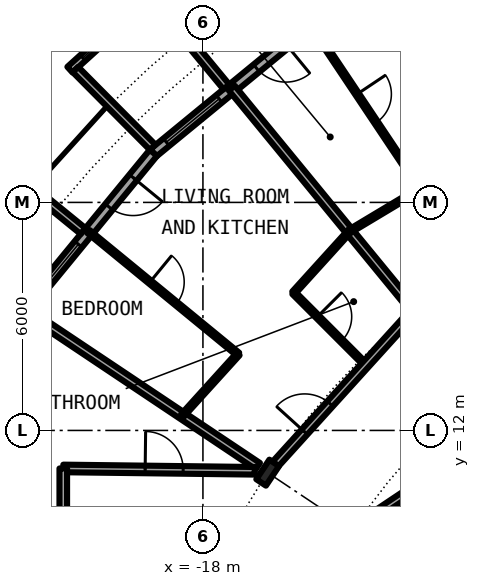
"""IFC4 building model, lengths in metres.
Left out: names, types, materials, properties, quantities, classifications, styles, units other than length and angle.
Written with IfcOpenShell. Run it as: python <this file> out.ifc"""

import sys

from ifc_helpers import new_model, si_unit, direction, frame, frame_2d, origin, origin_2d, place, context, subcontext, project, spatial, rectangle, circle, i_section, extrude, element, fill, save


model = new_model("IFC4")
c1 = context("Model", 3, precision=1e-05, world=origin(), true_north=direction((0.0, 1.0)))
c2 = subcontext(c1, "Body", "Model", "MODEL_VIEW")
j1 = project(units=[si_unit("LENGTHUNIT", "METRE"), si_unit("PLANEANGLEUNIT", "RADIAN")], contexts=[c1])
p1 = place(None, origin())
s1 = spatial("IfcSite", under=j1, at=p1, CompositionType="ELEMENT")
p2 = place(p1, origin())
s2 = spatial("IfcBuilding", under=s1, at=p2, CompositionType="ELEMENT")
p3 = place(p2, frame((0.0, 0.0, 31.95)))
s3 = spatial("IfcBuildingStorey", under=s2, at=p3, CompositionType="ELEMENT", Elevation=31.95)
p4 = place(p3, frame((-16.297, 10.889, 0.0), z_axis=(0.0, 0.0, 1.0), x_axis=(-0.831469612303, 0.55557023302, 0.0)))
e1 = element("IfcColumn", 1, at=p4, inside=s3, PredefinedType="COLUMN", context=c2, shape_type="SweptSolid", body=[
    extrude(i_section(OverallWidth=0.305, OverallDepth=0.62, WebThickness=0.021, FlangeThickness=0.04, FilletRadius=0.027, at=origin_2d()), origin(), (0.0, 0.0, 1.0), 3.05),
])
p5 = place(p3, frame((-15.167, 22.699, 0.0), z_axis=(0.0, 0.0, 1.0), x_axis=(-0.773019449054, -0.634382322723, 0.0)))
e2 = element("IfcWall", 2, at=p5, inside=s3, PredefinedType="SOLIDWALL", context=c2, shape_type="SweptSolid", body=[
    extrude(rectangle(XDim=5.352, YDim=0.25, at=frame_2d((2.676, 0.0))), origin(), (0.0, 0.0, 1.0), 2.7),
])
p6 = place(p5, frame((0.841, 0.0, 0.0)))
e3 = element("IfcOpeningElement", 3, at=p6, cuts=e2, PredefinedType="OPENING", context=c2, shape_type="SweptSolid", body=[
    extrude(rectangle(XDim=1.0, YDim=2.2, at=frame_2d((0.5, 1.1))), frame((0.0, 0.135, 0.0), z_axis=(0.0, -1.0, 0.0), x_axis=(1.0, 0.0, 0.0)), (0.0, 0.0, 1.0), 0.27),
])
p7 = place(p5, frame((3.111, 0.0, 0.3)))
e4 = element("IfcOpeningElement", 4, at=p7, cuts=e2, PredefinedType="OPENING", context=c2, shape_type="SweptSolid", body=[
    extrude(rectangle(XDim=1.8, YDim=2.1, at=frame_2d((0.9, 1.05))), frame((0.0, 0.135, 0.0), z_axis=(0.0, -1.0, 0.0), x_axis=(1.0, 0.0, 0.0)), (0.0, 0.0, 1.0), 0.27),
])
p8 = place(p3, frame((-19.282, 23.503, -0.03), z_axis=(0.0, 0.0, 1.0), x_axis=(-0.740998365753, -0.671506829416, 0.0)))
e5 = element("IfcWall", 5, at=p8, inside=s3, PredefinedType="SOLIDWALL", context=c2, shape_type="SweptSolid", body=[
    extrude(rectangle(XDim=2.993, YDim=0.2, at=frame_2d((1.497, 0.0))), origin(), (0.0, 0.0, 1.0), 2.73),
])
p9 = place(p8, frame((0.457, 0.0, 0.33)))
e6 = element("IfcOpeningElement", 6, at=p9, cuts=e5, PredefinedType="OPENING", context=c2, shape_type="SweptSolid", body=[
    extrude(circle(Radius=1.04, at=frame_2d((1.04, 1.04))), frame((0.0, 0.11, 0.0), z_axis=(0.0, -1.0, 0.0), x_axis=(1.0, 0.0, 0.0)), (0.0, 0.0, 1.0), 0.22),
])
p10 = place(p3, frame((-17.384, 21.041, -0.03), z_axis=(0.0, 0.0, 1.0), x_axis=(-0.63709551667, 0.770784861449, 0.0)))
e7 = element("IfcWall", 7, at=p10, inside=s3, PredefinedType="SOLIDWALL", context=c2, shape_type="SweptSolid", body=[
    extrude(rectangle(XDim=3.006, YDim=0.2, at=frame_2d((1.503, 0.0))), origin(), (0.0, 0.0, 1.0), 2.73),
])
p11 = place(p3, frame((-19.323, 19.45, -0.03), z_axis=(0.0, 0.0, 1.0), x_axis=(-0.704476739375, 0.709727076896, 0.0)))
e8 = element("IfcWall", 8, at=p11, inside=s3, PredefinedType="SOLIDWALL", context=c2, shape_type="SweptSolid", body=[
    extrude(rectangle(XDim=2.883, YDim=0.2, at=frame_2d((1.441, 0.0))), origin(), (0.0, 0.0, 1.0), 2.73),
])
p12 = place(p3, frame((-19.304, 19.304, 0.0), z_axis=(0.0, 0.0, 1.0), x_axis=(-0.634382322723, -0.773019449054, 0.0)))
e9 = element("IfcWall", 9, at=p12, inside=s3, PredefinedType="SOLIDWALL", context=c2, shape_type="SweptSolid", body=[
    extrude(rectangle(XDim=5.352, YDim=0.25, at=frame_2d((2.676, 0.0))), origin(), (0.0, 0.0, 1.0), 2.7),
])
p13 = place(p12, frame((0.841, 0.0, 0.0)))
e10 = element("IfcOpeningElement", 10, at=p13, cuts=e9, PredefinedType="OPENING", context=c2, shape_type="SweptSolid", body=[
    extrude(rectangle(XDim=1.0, YDim=2.2, at=frame_2d((0.5, 1.1))), frame((0.0, 0.135, 0.0), z_axis=(0.0, -1.0, 0.0), x_axis=(1.0, 0.0, 0.0)), (0.0, 0.0, 1.0), 0.27),
])
p14 = place(p12, frame((3.111, 0.0, 0.3)))
e11 = element("IfcOpeningElement", 11, at=p14, cuts=e9, PredefinedType="OPENING", context=c2, shape_type="SweptSolid", body=[
    extrude(rectangle(XDim=1.8, YDim=2.1, at=frame_2d((0.9, 1.05))), frame((0.0, 0.135, 0.0), z_axis=(0.0, -1.0, 0.0), x_axis=(1.0, 0.0, 0.0)), (0.0, 0.0, 1.0), 0.27),
])
p15 = place(p3, frame((-21.155, 17.246, -0.03), z_axis=(0.0, 0.0, 1.0), x_axis=(-0.775179004516, 0.631741648902, 0.0)))
e12 = element("IfcWall", 12, at=p15, inside=s3, PredefinedType="SOLIDWALL", context=c2, shape_type="SweptSolid", body=[
    extrude(rectangle(XDim=3.006, YDim=0.2, at=frame_2d((1.503, 0.0))), origin(), (0.0, 0.0, 1.0), 2.73),
])
p16 = place(p3, frame((-22.595, 15.097, 0.0), z_axis=(0.0, 0.0, 1.0), x_axis=(0.831465568067, -0.555576285599, 0.0)))
e13 = element("IfcWall", 13, at=p16, inside=s3, PredefinedType="PARTITIONING", context=c2, shape_type="SweptSolid", body=[
    extrude(rectangle(XDim=7.264, YDim=0.2, at=frame_2d((3.632, 0.0))), origin(), (0.0, 0.0, 1.0), 2.7),
])
p17 = place(p3, frame((-21.012, 17.233, 0.0), z_axis=(0.0, 0.0, 1.0), x_axis=(0.77326214499, -0.634086472908, 0.0)))
e14 = element("IfcWall", 14, at=p17, inside=s3, PredefinedType="PARTITIONING", context=c2, shape_type="SweptSolid", body=[
    extrude(rectangle(XDim=5.089, YDim=0.1, at=frame_2d((2.544, 0.0))), origin(), (0.0, 0.0, 1.0), 2.7),
])
p18 = place(p17, frame((2.094, 0.0, 0.0)))
e15 = element("IfcOpeningElement", 15, at=p18, cuts=e14, PredefinedType="OPENING", context=c2, shape_type="SweptSolid", body=[
    extrude(rectangle(XDim=0.9, YDim=2.3, at=frame_2d((0.45, 1.15))), frame((0.0, 0.06, 0.0), z_axis=(0.0, -1.0, 0.0), x_axis=(1.0, 0.0, 0.0)), (0.0, 0.0, 1.0), 0.12),
])
p19 = place(p3, frame((-17.24, 21.007, 0.0), z_axis=(0.0, 0.0, 1.0), x_axis=(0.634381303318, -0.773020285633, 0.0)))
e16 = element("IfcWall", 16, at=p19, inside=s3, PredefinedType="PARTITIONING", context=c2, shape_type="SweptSolid", body=[
    extrude(rectangle(XDim=7.576, YDim=0.2, at=frame_2d((3.788, 0.0))), origin(), (0.0, 0.0, 1.0), 2.7),
])
p20 = place(p3, frame((-15.612, 15.622, 0.0), z_axis=(0.0, 0.0, 1.0), x_axis=(0.706741540154, -0.707471833659, 0.0)))
e17 = element("IfcWall", 17, at=p20, inside=s3, PredefinedType="PARTITIONING", context=c2, shape_type="SweptSolid", body=[
    extrude(rectangle(XDim=2.674, YDim=0.1, at=frame_2d((1.337, 0.0))), origin(), (0.0, 0.0, 1.0), 2.7),
])
p21 = place(p20, frame((0.887, 0.0, 0.0)))
e18 = element("IfcOpeningElement", 18, at=p21, cuts=e17, PredefinedType="OPENING", context=c2, shape_type="SweptSolid", body=[
    extrude(rectangle(XDim=0.9, YDim=2.3, at=frame_2d((0.45, 1.15))), frame((0.0, 0.06, 0.0), z_axis=(0.0, -1.0, 0.0), x_axis=(1.0, 0.0, 0.0)), (0.0, 0.0, 1.0), 0.12),
])
p22 = place(p3, frame((-15.105, 22.59, 0.0), z_axis=(0.0, 0.0, 1.0), x_axis=(0.555939561221, -0.831222716406, 0.0)))
e19 = element("IfcWall", 19, at=p22, inside=s3, PredefinedType="PARTITIONING", context=c2, shape_type="SweptSolid", body=[
    extrude(rectangle(XDim=5.089, YDim=0.1, at=frame_2d((2.544, 0.0))), origin(), (0.0, 0.0, 1.0), 2.7),
])
p23 = place(p22, frame((2.094, 0.0, 0.0)))
e20 = element("IfcOpeningElement", 20, at=p23, cuts=e19, PredefinedType="OPENING", context=c2, shape_type="SweptSolid", body=[
    extrude(rectangle(XDim=0.9, YDim=2.3, at=frame_2d((0.45, 1.15))), frame((0.0, 0.06, 0.0), z_axis=(0.0, -1.0, 0.0), x_axis=(1.0, 0.0, 0.0)), (0.0, 0.0, 1.0), 0.12),
])
p24 = place(p3, frame((-21.675, 11.0, 0.0), z_axis=(0.0, 0.0, 1.0), x_axis=(0.99992425795, -0.012307654658, 0.0)))
e21 = element("IfcWall", 21, at=p24, inside=s3, PredefinedType="PARTITIONING", context=c2, shape_type="SweptSolid", body=[
    extrude(rectangle(XDim=5.039, YDim=0.2, at=frame_2d((2.519, 0.0))), origin(), (0.0, 0.0, 1.0), 2.7),
])
p25 = place(p24, frame((2.155, 0.0, 0.0)))
e22 = element("IfcOpeningElement", 22, at=p25, cuts=e21, PredefinedType="OPENING", context=c2, shape_type="SweptSolid", body=[
    extrude(rectangle(XDim=1.0, YDim=2.3, at=frame_2d((0.5, 1.15))), frame((0.0, 0.11, 0.0), z_axis=(0.0, -1.0, 0.0), x_axis=(1.0, 0.0, 0.0)), (0.0, 0.0, 1.0), 0.22),
])
p26 = place(p3, frame((-14.039, 9.396, 0.0), z_axis=(0.0, 0.0, 1.0), x_axis=(0.831348689697, 0.555751163866, 0.0)))
e23 = element("IfcWall", 23, at=p26, inside=s3, PredefinedType="PARTITIONING", context=c2, shape_type="SweptSolid", body=[
    extrude(rectangle(XDim=12.914, YDim=0.2, at=frame_2d((6.457, 0.0))), origin(), (0.0, 0.0, 1.0), 2.7),
])
p27 = place(p26, frame((7.568, 0.0, 0.0)))
e24 = element("IfcOpeningElement", 24, at=p27, cuts=e23, PredefinedType="OPENING", context=c2, shape_type="SweptSolid", body=[
    extrude(rectangle(XDim=1.0, YDim=2.3, at=frame_2d((0.5, 1.15))), frame((0.0, 0.11, 0.0), z_axis=(0.0, -1.0, 0.0), x_axis=(1.0, 0.0, 0.0)), (0.0, 0.0, 1.0), 0.22),
])
p28 = place(p3, frame((-16.193, 11.003, 0.0), z_axis=(0.0, 0.0, 1.0), x_axis=(0.671514934772, 0.740991020444, 0.0)))
e25 = element("IfcWall", 25, at=p28, inside=s3, PredefinedType="PARTITIONING", context=c2, shape_type="SweptSolid", body=[
    extrude(rectangle(XDim=5.598, YDim=0.2, at=frame_2d((2.799, 0.0))), origin(), (0.0, 0.0, 1.0), 2.38),
])
p29 = place(p28, frame((1.293, 0.0, 0.0)))
e26 = element("IfcOpeningElement", 26, at=p29, cuts=e25, PredefinedType="OPENING", context=c2, shape_type="SweptSolid", body=[
    extrude(rectangle(XDim=1.0, YDim=2.3, at=frame_2d((0.5, 1.15))), frame((0.0, 0.11, 0.0), z_axis=(0.0, -1.0, 0.0), x_axis=(1.0, 0.0, 0.0)), (0.0, 0.0, 1.0), 0.22),
])
p30 = place(p3, frame((-21.675, 9.4, 0.0), z_axis=(0.0, 0.0, 1.0), x_axis=(0.0, 1.0, 0.0)))
e27 = element("IfcWall", 27, at=p30, inside=s3, PredefinedType="PARTITIONING", context=c2, shape_type="SweptSolid", body=[
    extrude(rectangle(XDim=1.6, YDim=0.2, at=frame_2d((0.8, 0.0))), origin(), (0.0, 0.0, 1.0), 2.7),
])
for number, where, z_axis, x_axis in (
    (28, (-18.538, 12.394, 0.0), (0.0, 0.0, 1.0), (0.672, 0.741, 0.0)),
    (29, (-15.613, 15.621, 0.0), (0.0, 0.0, 1.0), (0.672, 0.741, 0.0)),
):
    element("IfcWall", number, at=place(p3, frame(where, z_axis=z_axis, x_axis=x_axis)), inside=s3, PredefinedType="PARTITIONING", context=c2, shape_type="SweptSolid", body=[
        extrude(rectangle(XDim=2.183, YDim=0.1, at=frame_2d((1.091, 0.0))), origin(), (0.0, 0.0, 1.0), 2.7),
    ])
p31 = place(p3, frame((-14.147, 17.237, 0.0), z_axis=(0.0, 0.0, 1.0), x_axis=(0.857660741648, 0.514215958752, 0.0)))
e30 = element("IfcWall", 30, at=p31, inside=s3, PredefinedType="PARTITIONING", context=c2, shape_type="SweptSolid", body=[
    extrude(rectangle(XDim=2.182, YDim=0.1, at=frame_2d((1.091, 0.0))), origin(), (0.0, 0.0, 1.0), 2.7),
])
p32 = place(p6, origin())
e31 = element("IfcDoor", 31, at=p32, inside=s3, OperationType="SINGLE_SWING_LEFT", PredefinedType="DOOR", context=c2, shape_type="SweptSolid", body=[
    extrude(rectangle(XDim=1.0, YDim=2.2, at=frame_2d((0.5, 1.1))), frame((0.0, 0.025, 0.0), z_axis=(0.0, -1.0, 0.0), x_axis=(1.0, 0.0, 0.0)), (0.0, 0.0, 1.0), 0.05),
])
fill(e3, e31)
p33 = place(p7, origin())
e32 = element("IfcWindow", 32, at=p33, inside=s3, PartitioningType="SINGLE_PANEL", PredefinedType="WINDOW", context=c2, shape_type="SweptSolid", body=[
    extrude(rectangle(XDim=1.8, YDim=2.1, at=frame_2d((0.9, 1.05))), frame((0.0, 0.03, 0.0), z_axis=(0.0, -1.0, 0.0), x_axis=(1.0, 0.0, 0.0)), (0.0, 0.0, 1.0), 0.06),
])
fill(e4, e32)
p34 = place(p9, origin())
e33 = element("IfcWindow", 33, at=p34, inside=s3, PartitioningType="SINGLE_PANEL", PredefinedType="WINDOW", context=c2, shape_type="SweptSolid", body=[
    extrude(circle(Radius=1.04, at=frame_2d((1.04, 1.04))), frame((0.0, 0.03, 0.0), z_axis=(0.0, -1.0, 0.0), x_axis=(1.0, 0.0, 0.0)), (0.0, 0.0, 1.0), 0.06),
])
fill(e6, e33)
p35 = place(p13, origin())
e34 = element("IfcDoor", 34, at=p35, inside=s3, OperationType="SINGLE_SWING_LEFT", PredefinedType="DOOR", context=c2, shape_type="SweptSolid", body=[
    extrude(rectangle(XDim=1.0, YDim=2.2, at=frame_2d((0.5, 1.1))), frame((0.0, 0.025, 0.0), z_axis=(0.0, -1.0, 0.0), x_axis=(1.0, 0.0, 0.0)), (0.0, 0.0, 1.0), 0.05),
])
fill(e10, e34)
p36 = place(p14, origin())
e35 = element("IfcWindow", 35, at=p36, inside=s3, PartitioningType="SINGLE_PANEL", PredefinedType="WINDOW", context=c2, shape_type="SweptSolid", body=[
    extrude(rectangle(XDim=1.8, YDim=2.1, at=frame_2d((0.9, 1.05))), frame((0.0, 0.03, 0.0), z_axis=(0.0, -1.0, 0.0), x_axis=(1.0, 0.0, 0.0)), (0.0, 0.0, 1.0), 0.06),
])
fill(e11, e35)
p37 = place(p23, origin())
e36 = element("IfcDoor", 36, at=p37, inside=s3, OperationType="SINGLE_SWING_RIGHT", PredefinedType="DOOR", context=c2, shape_type="SweptSolid", body=[
    extrude(rectangle(XDim=0.9, YDim=2.3, at=frame_2d((0.45, 1.15))), frame((0.0, 0.025, 0.0), z_axis=(0.0, -1.0, 0.0), x_axis=(1.0, 0.0, 0.0)), (0.0, 0.0, 1.0), 0.05),
])
fill(e20, e36)
p38 = place(p29, origin())
e37 = element("IfcDoor", 37, at=p38, inside=s3, OperationType="SINGLE_SWING_LEFT", PredefinedType="DOOR", context=c2, shape_type="SweptSolid", body=[
    extrude(rectangle(XDim=1.0, YDim=2.3, at=frame_2d((0.5, 1.15))), frame((0.0, 0.025, 0.0), z_axis=(0.0, -1.0, 0.0), x_axis=(1.0, 0.0, 0.0)), (0.0, 0.0, 1.0), 0.05),
])
fill(e26, e37)
p39 = place(p21, origin())
e38 = element("IfcDoor", 38, at=p39, inside=s3, OperationType="SINGLE_SWING_RIGHT", PredefinedType="DOOR", context=c2, shape_type="SweptSolid", body=[
    extrude(rectangle(XDim=0.9, YDim=2.3, at=frame_2d((0.45, 1.15))), frame((0.0, 0.025, 0.0), z_axis=(0.0, -1.0, 0.0), x_axis=(1.0, 0.0, 0.0)), (0.0, 0.0, 1.0), 0.05),
])
fill(e18, e38)
p40 = place(p18, origin())
e39 = element("IfcDoor", 39, at=p40, inside=s3, OperationType="SINGLE_SWING_RIGHT", PredefinedType="DOOR", context=c2, shape_type="SweptSolid", body=[
    extrude(rectangle(XDim=0.9, YDim=2.3, at=frame_2d((0.45, 1.15))), frame((0.0, 0.025, 0.0), z_axis=(0.0, -1.0, 0.0), x_axis=(1.0, 0.0, 0.0)), (0.0, 0.0, 1.0), 0.05),
])
fill(e15, e39)
p41 = place(p25, origin())
e40 = element("IfcDoor", 40, at=p41, inside=s3, OperationType="SINGLE_SWING_RIGHT", PredefinedType="DOOR", context=c2, shape_type="SweptSolid", body=[
    extrude(rectangle(XDim=1.0, YDim=2.3, at=frame_2d((0.5, 1.15))), frame((0.0, 0.025, 0.0), z_axis=(0.0, -1.0, 0.0), x_axis=(1.0, 0.0, 0.0)), (0.0, 0.0, 1.0), 0.05),
])
fill(e22, e40)
save(model, sys.argv[1])
